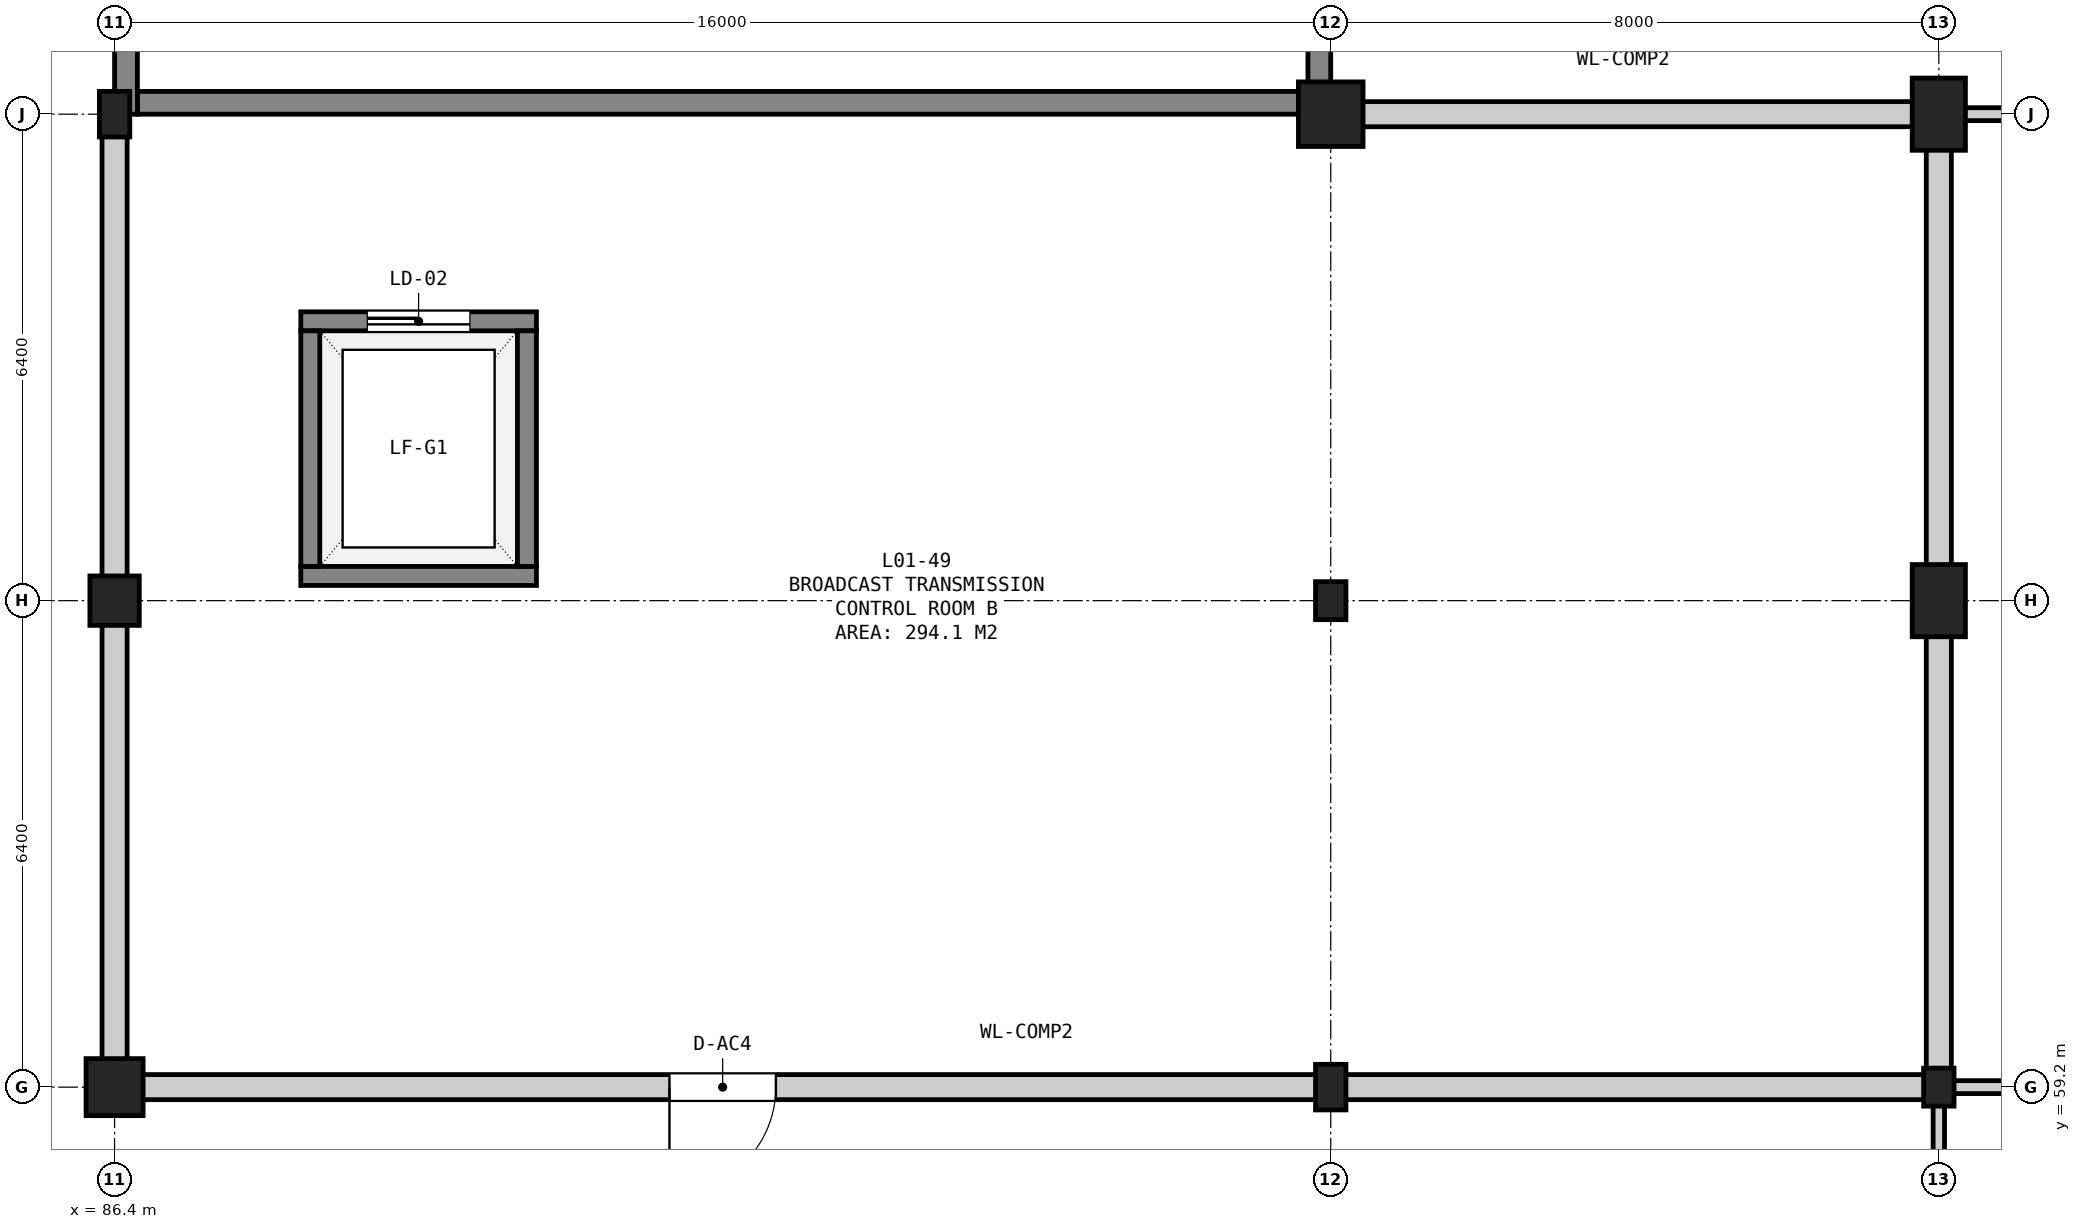
"""IFC4 building model, lengths in metres.
Left out: names, types, materials, properties, quantities, classifications, styles, units other than length and angle.
Written with IfcOpenShell. Run it as: python <this file> out.ifc"""

import sys

from ifc_helpers import new_model, si_unit, direction, frame, frame_2d, origin, origin_2d, place, context, subcontext, project, spatial, rectangle, extrude, element, fill, save


model = new_model("IFC4")
c1 = context("Model", 3, precision=1e-05, world=origin(), true_north=direction((0.0, 1.0)))
c2 = subcontext(c1, "Body", "Model", "MODEL_VIEW")
j1 = project(units=[si_unit("LENGTHUNIT", "METRE"), si_unit("PLANEANGLEUNIT", "RADIAN")], contexts=[c1])
p1 = place(None, origin())
s1 = spatial("IfcSite", under=j1, at=p1, CompositionType="ELEMENT")
p2 = place(p1, origin())
s2 = spatial("IfcBuilding", under=s1, at=p2, CompositionType="ELEMENT")
p3 = place(p2, frame((0.0, 0.0, 5.4)))
s3 = spatial("IfcBuildingStorey", under=s2, at=p3, CompositionType="ELEMENT", Elevation=5.4)
p4 = place(p3, frame((86.4, 59.2, 0.0), z_axis=(0.0, 0.0, 1.0), x_axis=(1.0, 0.0, 0.0)))
e1 = element("IfcColumn", 1, at=p4, inside=s3, PredefinedType="COLUMN", context=c2, shape_type="SweptSolid", body=[
    extrude(rectangle(XDim=0.75, YDim=0.75, at=origin_2d()), origin(), (0.0, 0.0, 1.0), 5.4),
])
p5 = place(p3, frame((86.4, 65.6, 0.0), z_axis=(0.0, 0.0, 1.0), x_axis=(1.0, 0.0, 0.0)))
e2 = element("IfcColumn", 2, at=p5, inside=s3, PredefinedType="COLUMN", context=c2, shape_type="SweptSolid", body=[
    extrude(rectangle(XDim=0.65, YDim=0.65, at=origin_2d()), origin(), (0.0, 0.0, 1.0), 5.4),
])
for number, where, z_axis, x_axis in (
    (3, (86.4, 72.0, 0.0), (0.0, 0.0, 1.0), (1.0, 0.0, 0.0)),
    (4, (102.4, 59.2, 0.0), (0.0, 0.0, 1.0), (1.0, 0.0, 0.0)),
):
    element("IfcColumn", number, at=place(p3, frame(where, z_axis=z_axis, x_axis=x_axis)), inside=s3, PredefinedType="COLUMN", context=c2, shape_type="SweptSolid", body=[
        extrude(rectangle(XDim=0.4, YDim=0.6, at=origin_2d()), origin(), (0.0, 0.0, 1.0), 5.4),
    ])
p6 = place(p3, frame((102.4, 65.6, 0.0), z_axis=(0.0, 0.0, 1.0), x_axis=(1.0, 0.0, 0.0)))
e5 = element("IfcColumn", 5, at=p6, inside=s3, PredefinedType="COLUMN", context=c2, shape_type="SweptSolid", body=[
    extrude(rectangle(XDim=0.4, YDim=0.5, at=origin_2d()), origin(), (0.0, 0.0, 1.0), 5.4),
])
p7 = place(p3, frame((102.4, 72.0, 0.0), z_axis=(0.0, 0.0, 1.0), x_axis=(1.0, 0.0, 0.0)))
e6 = element("IfcColumn", 6, at=p7, inside=s3, PredefinedType="COLUMN", context=c2, shape_type="SweptSolid", body=[
    extrude(rectangle(XDim=0.85, YDim=0.85, at=origin_2d()), origin(), (0.0, 0.0, 1.0), 5.4),
])
p8 = place(p3, frame((110.4, 59.2, 0.0), z_axis=(0.0, 0.0, 1.0), x_axis=(1.0, 0.0, 0.0)))
e7 = element("IfcColumn", 7, at=p8, inside=s3, PredefinedType="COLUMN", context=c2, shape_type="SweptSolid", body=[
    extrude(rectangle(XDim=0.4, YDim=0.5, at=origin_2d()), origin(), (0.0, 0.0, 1.0), 5.4),
])
for number, where, z_axis, x_axis in (
    (8, (110.4, 65.6, 0.0), (0.0, 0.0, 1.0), (1.0, 0.0, 0.0)),
    (9, (110.4, 72.0, 0.0), (0.0, 0.0, 1.0), (1.0, 0.0, 0.0)),
):
    element("IfcColumn", number, at=place(p3, frame(where, z_axis=z_axis, x_axis=x_axis)), inside=s3, PredefinedType="COLUMN", context=c2, shape_type="SweptSolid", body=[
        extrude(rectangle(XDim=0.7, YDim=0.95, at=origin_2d()), origin(), (0.0, 0.0, 1.0), 5.4),
    ])
p9 = place(p3, frame((86.7, 72.15, 0.0), z_axis=(0.0, 0.0, 1.0), x_axis=(1.0, 0.0, 0.0)))
e10 = element("IfcWall", 10, at=p9, inside=s3, PredefinedType="SHEAR", context=c2, shape_type="SweptSolid", body=[
    extrude(rectangle(XDim=15.4, YDim=0.3, at=frame_2d((7.7, 0.0))), origin(), (0.0, 0.0, 1.0), 5.1),
])
for number, where, z_axis, x_axis in (
    (11, (86.55, 72.0, 0.0), (0.0, 0.0, 1.0), (0.0, 1.0, 0.0)),
    (12, (102.25, 72.0, 0.0), (0.0, 0.0, 1.0), (0.0, 1.0, 0.0)),
):
    element("IfcWall", number, at=place(p3, frame(where, z_axis=z_axis, x_axis=x_axis)), inside=s3, PredefinedType="SHEAR", context=c2, shape_type="SweptSolid", body=[
        extrude(rectangle(XDim=15.2, YDim=0.3, at=frame_2d((7.6, 0.0))), origin(), (0.0, 0.0, 1.0), 5.1),
    ])
p10 = place(p3, frame((88.85, 65.925, 0.0), z_axis=(0.0, 0.0, 1.0), x_axis=(1.0, 0.0, 0.0)))
e13 = element("IfcWall", 13, at=p10, inside=s3, PredefinedType="SHEAR", context=c2, shape_type="SweptSolid", body=[
    extrude(rectangle(XDim=3.1, YDim=0.25, at=frame_2d((1.55, 0.0))), origin(), (0.0, 0.0, 1.0), 5.1),
])
p11 = place(p3, frame((88.85, 69.275, 0.0), z_axis=(0.0, 0.0, 1.0), x_axis=(1.0, 0.0, 0.0)))
e14 = element("IfcWall", 14, at=p11, inside=s3, PredefinedType="SHEAR", context=c2, shape_type="SweptSolid", body=[
    extrude(rectangle(XDim=3.1, YDim=0.25, at=frame_2d((1.55, 0.0))), origin(), (0.0, 0.0, 1.0), 5.1),
])
p12 = place(p11, frame((0.875, 0.0, 0.0)))
e15 = element("IfcOpeningElement", 15, at=p12, cuts=e14, PredefinedType="OPENING", context=c2, shape_type="SweptSolid", body=[
    extrude(rectangle(XDim=1.35, YDim=2.2, at=frame_2d((0.675, 1.1))), frame((0.0, 0.137, 0.0), z_axis=(0.0, -1.0, 0.0), x_axis=(1.0, 0.0, 0.0)), (0.0, 0.0, 1.0), 0.274),
])
for number, where, z_axis, x_axis in (
    (16, (88.975, 66.05, 0.0), (0.0, 0.0, 1.0), (0.0, 1.0, 0.0)),
    (17, (91.825, 66.05, 0.0), (0.0, 0.0, 1.0), (0.0, 1.0, 0.0)),
):
    element("IfcWall", number, at=place(p3, frame(where, z_axis=z_axis, x_axis=x_axis)), inside=s3, PredefinedType="SHEAR", context=c2, shape_type="SweptSolid", body=[
        extrude(rectangle(XDim=3.1, YDim=0.25, at=frame_2d((1.55, 0.0))), origin(), (0.0, 0.0, 1.0), 5.1),
    ])
p13 = place(p3, frame((110.54, 59.2, 0.0), z_axis=(0.0, 0.0, 1.0), x_axis=(1.0, 0.0, 0.0)))
e18 = element("IfcWall", 18, at=p13, inside=s3, PredefinedType="PARTITIONING", context=c2, shape_type="SweptSolid", body=[
    extrude(rectangle(XDim=6.12, YDim=0.17, at=frame_2d((3.06, 0.0))), origin(), (0.0, 0.0, 1.0), 4.335),
])
p14 = place(p3, frame((110.4, 51.2, 0.0), z_axis=(0.0, 0.0, 1.0), x_axis=(0.0, 1.0, 0.0)))
e19 = element("IfcWall", 19, at=p14, inside=s3, PredefinedType="PARTITIONING", context=c2, shape_type="SweptSolid", body=[
    extrude(rectangle(XDim=7.86, YDim=0.15, at=frame_2d((3.93, 0.0))), origin(), (0.0, 0.0, 1.0), 4.335),
])
p15 = place(p3, frame((86.54, 59.2, 0.0), z_axis=(0.0, 0.0, 1.0), x_axis=(1.0, 0.0, 0.0)))
e20 = element("IfcWall", 20, at=p15, inside=s3, PredefinedType="SOLIDWALL", context=c2, shape_type="SweptSolid", body=[
    extrude(rectangle(XDim=23.72, YDim=0.33, at=frame_2d((11.86, 0.0))), origin(), (0.0, 0.0, 1.0), 4.385),
])
p16 = place(p15, frame((7.16, 0.0, 0.0)))
e21 = element("IfcOpeningElement", 21, at=p16, cuts=e20, PredefinedType="OPENING", context=c2, shape_type="SweptSolid", body=[
    extrude(rectangle(XDim=1.4, YDim=2.2, at=frame_2d((0.7, 1.1))), frame((0.0, 0.177, 0.0), z_axis=(0.0, -1.0, 0.0), x_axis=(1.0, 0.0, 0.0)), (0.0, 0.0, 1.0), 0.354),
])
p17 = place(p3, frame((102.24, 72.0, 0.0), z_axis=(0.0, 0.0, 1.0), x_axis=(1.0, 0.0, 0.0)))
e22 = element("IfcWall", 22, at=p17, inside=s3, PredefinedType="SOLIDWALL", context=c2, shape_type="SweptSolid", body=[
    extrude(rectangle(XDim=8.02, YDim=0.33, at=frame_2d((4.01, 0.0))), origin(), (0.0, 0.0, 1.0), 4.775),
])
p18 = place(p3, frame((86.4, 59.34, 0.0), z_axis=(0.0, 0.0, 1.0), x_axis=(0.0, 1.0, 0.0)))
e23 = element("IfcWall", 23, at=p18, inside=s3, PredefinedType="SOLIDWALL", context=c2, shape_type="SweptSolid", body=[
    extrude(rectangle(XDim=12.52, YDim=0.33, at=frame_2d((6.26, 0.0))), origin(), (0.0, 0.0, 1.0), 4.535),
])
p19 = place(p3, frame((110.4, 59.34, 0.0), z_axis=(0.0, 0.0, 1.0), x_axis=(0.0, 1.0, 0.0)))
e24 = element("IfcWall", 24, at=p19, inside=s3, PredefinedType="SOLIDWALL", context=c2, shape_type="SweptSolid", body=[
    extrude(rectangle(XDim=12.52, YDim=0.33, at=frame_2d((6.26, 0.0))), origin(), (0.0, 0.0, 1.0), 4.235),
])
p20 = place(p3, frame((110.4, 72.0, 0.0), z_axis=(0.0, 0.0, 1.0), x_axis=(1.0, 0.0, 0.0)))
e25 = element("IfcWall", 25, at=p20, inside=s3, PredefinedType="PARTITIONING", context=c2, shape_type="SweptSolid", body=[
    extrude(rectangle(XDim=10.26, YDim=0.17, at=frame_2d((5.13, 0.0))), origin(), (0.0, 0.0, 1.0), 4.485),
])
p21 = place(p12, origin())
e26 = element("IfcDoor", 26, at=p21, inside=s3, OperationType="SLIDING_TO_LEFT", PredefinedType="DOOR", context=c2, shape_type="SweptSolid", body=[
    extrude(rectangle(XDim=1.35, YDim=2.2, at=frame_2d((0.675, 1.1))), frame((0.0, 0.025, 0.0), z_axis=(0.0, -1.0, 0.0), x_axis=(1.0, 0.0, 0.0)), (0.0, 0.0, 1.0), 0.05),
])
fill(e15, e26)
p22 = place(p16, frame((1.4, 0.0, 0.0), z_axis=(0.0, 0.0, 1.0), x_axis=(-1.0, 0.0, 0.0)))
e27 = element("IfcDoor", 27, at=p22, inside=s3, OperationType="SINGLE_SWING_RIGHT", PredefinedType="DOOR", context=c2, shape_type="SweptSolid", body=[
    extrude(rectangle(XDim=1.4, YDim=2.2, at=frame_2d((0.7, 1.1))), frame((0.0, 0.025, 0.0), z_axis=(0.0, -1.0, 0.0), x_axis=(1.0, 0.0, 0.0)), (0.0, 0.0, 1.0), 0.05),
])
fill(e21, e27)
save(model, sys.argv[1])
